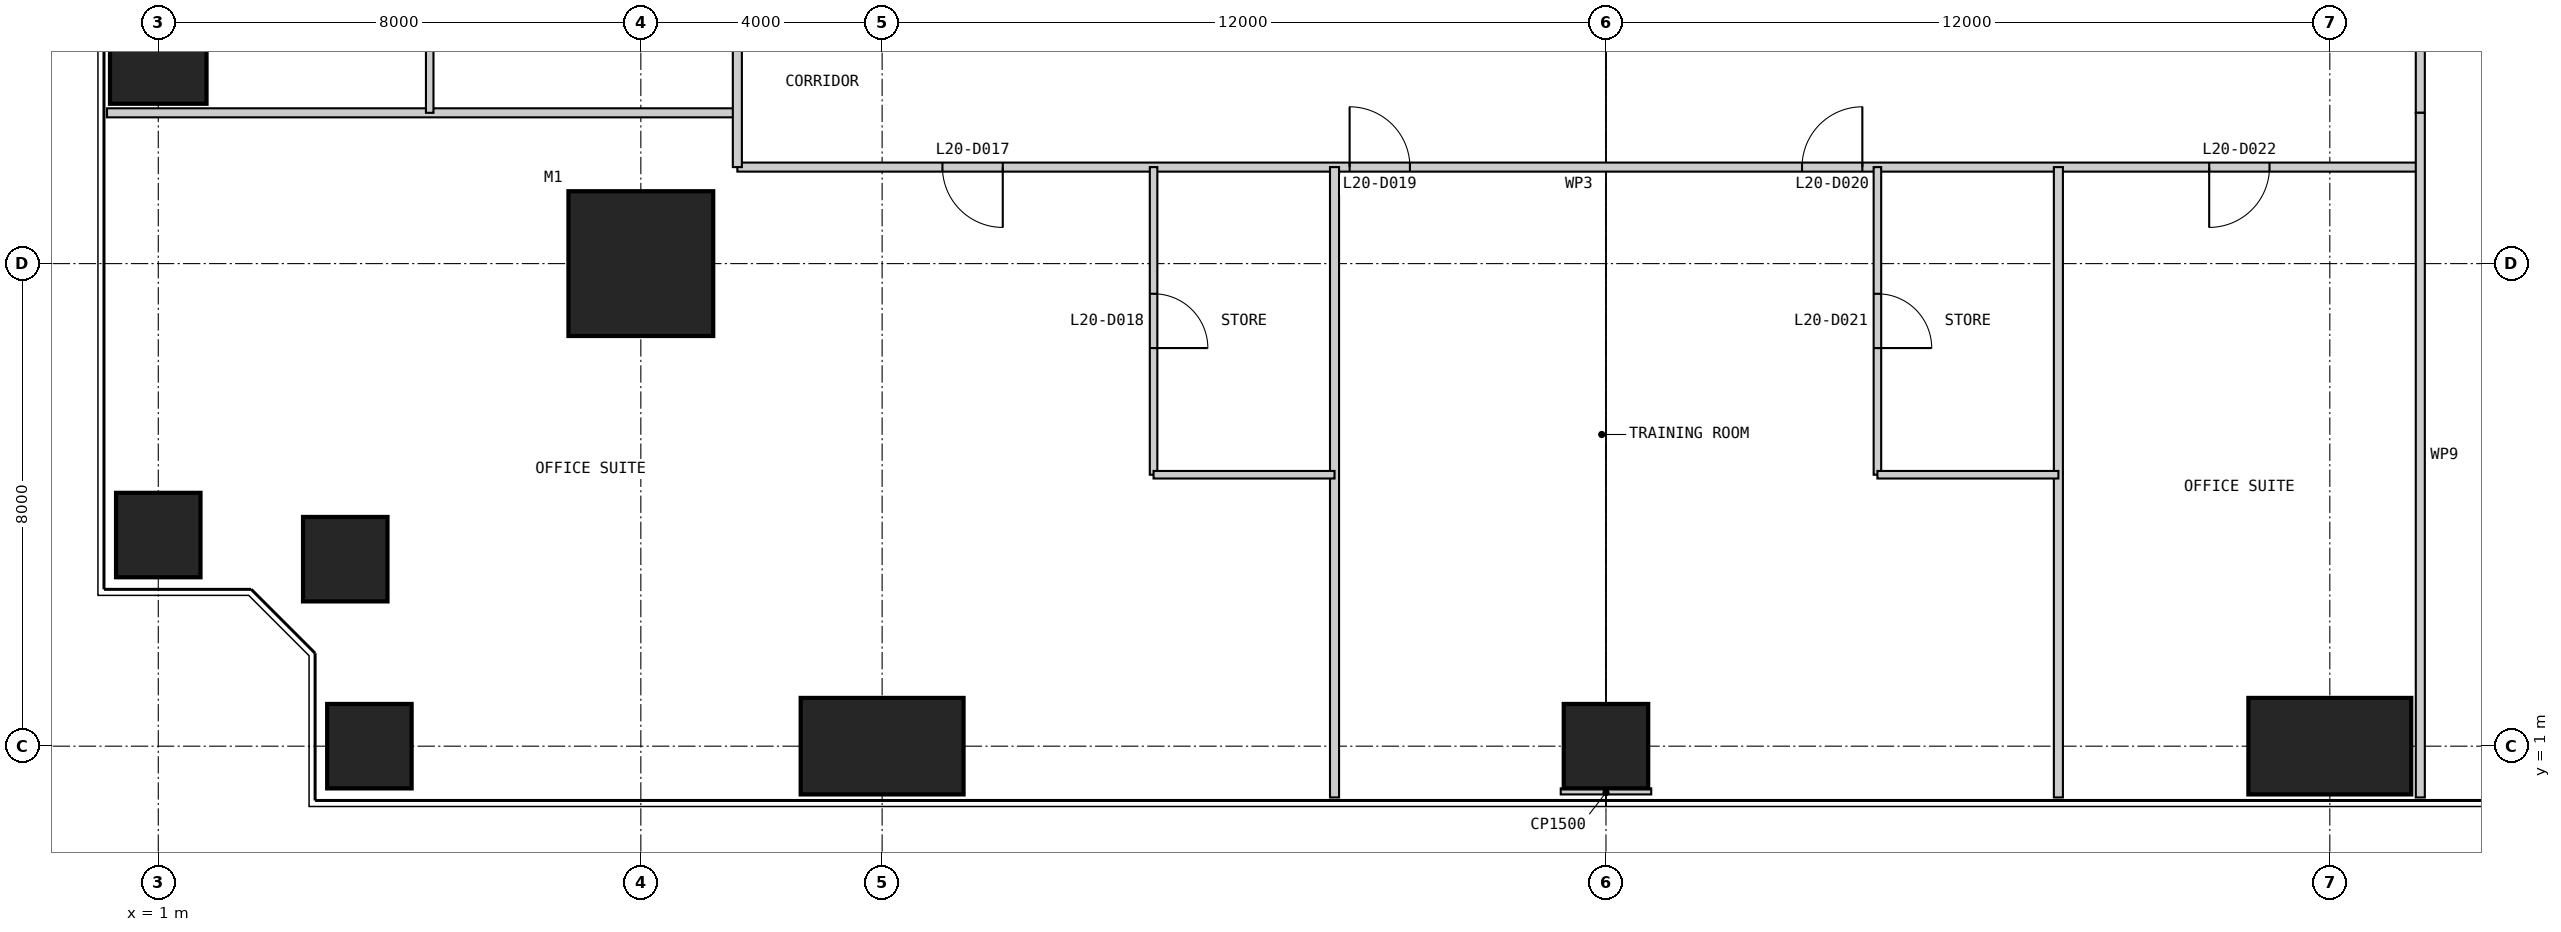
"""IFC4 building model, lengths in metres.
Left out: names, types, materials, properties, quantities, classifications, styles, units other than length and angle.
Written with IfcOpenShell. Run it as: python <this file> out.ifc"""

import sys

from ifc_helpers import new_model, si_unit, direction, frame, frame_2d, origin, origin_2d, place, context, subcontext, project, spatial, rectangle, extrude, element, fill, save


model = new_model("IFC4")
c1 = context("Model", 3, precision=1e-05, world=origin(), true_north=direction((0.0, 1.0)))
c2 = subcontext(c1, "Body", "Model", "MODEL_VIEW")
j1 = project(units=[si_unit("LENGTHUNIT", "METRE"), si_unit("PLANEANGLEUNIT", "RADIAN")], contexts=[c1])
p1 = place(None, origin())
s1 = spatial("IfcSite", under=j1, at=p1, CompositionType="ELEMENT")
p2 = place(p1, origin())
s2 = spatial("IfcBuilding", under=s1, at=p2, CompositionType="ELEMENT")
p3 = place(p2, frame((0.0, 0.0, 87.0)))
s3 = spatial("IfcBuildingStorey", under=s2, at=p3, CompositionType="ELEMENT", Elevation=87.0)
p4 = place(p3, frame((9.0, 9.0, 0.0), z_axis=(0.0, 0.0, 1.0), x_axis=(1.0, 0.0, 0.0)))
e1 = element("IfcColumn", 1, at=p4, inside=s3, PredefinedType="COLUMN", context=c2, shape_type="SweptSolid", body=[
    extrude(rectangle(XDim=2.4, YDim=2.4, at=origin_2d()), origin(), (0.0, 0.0, 1.0), 4.0),
])
p5 = place(p3, frame((4.5, 1.0, 0.0), z_axis=(0.0, 0.0, 1.0), x_axis=(1.0, 0.0, 0.0)))
e2 = element("IfcColumn", 2, at=p5, inside=s3, PredefinedType="COLUMN", context=c2, shape_type="SweptSolid", body=[
    extrude(rectangle(XDim=1.4, YDim=1.4, at=origin_2d()), origin(), (0.0, 0.0, 1.0), 4.0),
])
p6 = place(p3, frame((13.0, 1.0, 0.0), z_axis=(0.0, 0.0, 1.0), x_axis=(1.0, 0.0, 0.0)))
e3 = element("IfcColumn", 3, at=p6, inside=s3, PredefinedType="COLUMN", context=c2, shape_type="SweptSolid", body=[
    extrude(rectangle(XDim=2.7, YDim=1.6, at=origin_2d()), origin(), (0.0, 0.0, 1.0), 4.0),
])
p7 = place(p3, frame((25.0, 1.0, 0.0), z_axis=(0.0, 0.0, 1.0), x_axis=(1.0, 0.0, 0.0)))
e4 = element("IfcColumn", 4, at=p7, inside=s3, PredefinedType="COLUMN", context=c2, shape_type="SweptSolid", body=[
    extrude(rectangle(XDim=1.4, YDim=1.4, at=origin_2d()), origin(), (0.0, 0.0, 1.0), 4.0),
])
p8 = place(p3, frame((37.0, 1.0, 0.0), z_axis=(0.0, 0.0, 1.0), x_axis=(1.0, 0.0, 0.0)))
e5 = element("IfcColumn", 5, at=p8, inside=s3, PredefinedType="COLUMN", context=c2, shape_type="SweptSolid", body=[
    extrude(rectangle(XDim=2.7, YDim=1.6, at=origin_2d()), origin(), (0.0, 0.0, 1.0), 4.0),
])
p9 = place(p3, frame((1.0, 13.0, 0.0), z_axis=(0.0, 0.0, 1.0), x_axis=(1.0, 0.0, 0.0)))
e6 = element("IfcColumn", 6, at=p9, inside=s3, PredefinedType="COLUMN", context=c2, shape_type="SweptSolid", body=[
    extrude(rectangle(XDim=1.6, YDim=2.7, at=origin_2d()), origin(), (0.0, 0.0, 1.0), 4.0),
])
for number, where, z_axis, x_axis in (
    (7, (1.0, 4.5, 0.0), (0.0, 0.0, 1.0), (1.0, 0.0, 0.0)),
    (8, (4.1, 4.1, 0.0), (0.0, 0.0, 1.0), (1.0, 0.0, 0.0)),
):
    element("IfcColumn", number, at=place(p3, frame(where, z_axis=z_axis, x_axis=x_axis)), inside=s3, PredefinedType="COLUMN", context=c2, shape_type="SweptSolid", body=[
        extrude(rectangle(XDim=1.4, YDim=1.4, at=origin_2d()), origin(), (0.0, 0.0, 1.0), 4.0),
    ])
p10 = place(p3, frame((10.6, 10.6, 0.0), z_axis=(0.0, 0.0, 1.0), x_axis=(1.0, 0.0, 0.0)))
e9 = element("IfcWall", 9, at=p10, inside=s3, PredefinedType="PARTITIONING", context=c2, shape_type="SweptSolid", body=[
    extrude(rectangle(XDim=27.9, YDim=0.15, at=frame_2d((13.95, 0.0))), origin(), (0.0, 0.0, 1.0), 3.8),
])
p11 = place(p10, frame((3.4, 0.0, 0.0)))
e10 = element("IfcOpeningElement", 10, at=p11, cuts=e9, PredefinedType="OPENING", context=c2, shape_type="SweptSolid", body=[
    extrude(rectangle(XDim=1.0, YDim=2.2, at=frame_2d((0.5, 1.1))), frame((0.0, 0.085, 0.0), z_axis=(0.0, -1.0, 0.0), x_axis=(1.0, 0.0, 0.0)), (0.0, 0.0, 1.0), 0.17),
])
p12 = place(p10, frame((10.15, 0.0, 0.0)))
e11 = element("IfcOpeningElement", 11, at=p12, cuts=e9, PredefinedType="OPENING", context=c2, shape_type="SweptSolid", body=[
    extrude(rectangle(XDim=1.0, YDim=2.2, at=frame_2d((0.5, 1.1))), frame((0.0, 0.085, 0.0), z_axis=(0.0, -1.0, 0.0), x_axis=(1.0, 0.0, 0.0)), (0.0, 0.0, 1.0), 0.17),
])
p13 = place(p10, frame((17.65, 0.0, 0.0)))
e12 = element("IfcOpeningElement", 12, at=p13, cuts=e9, PredefinedType="OPENING", context=c2, shape_type="SweptSolid", body=[
    extrude(rectangle(XDim=1.0, YDim=2.2, at=frame_2d((0.5, 1.1))), frame((0.0, 0.085, 0.0), z_axis=(0.0, -1.0, 0.0), x_axis=(1.0, 0.0, 0.0)), (0.0, 0.0, 1.0), 0.17),
])
p14 = place(p10, frame((24.4, 0.0, 0.0)))
e13 = element("IfcOpeningElement", 13, at=p14, cuts=e9, PredefinedType="OPENING", context=c2, shape_type="SweptSolid", body=[
    extrude(rectangle(XDim=1.0, YDim=2.2, at=frame_2d((0.5, 1.1))), frame((0.0, 0.085, 0.0), z_axis=(0.0, -1.0, 0.0), x_axis=(1.0, 0.0, 0.0)), (0.0, 0.0, 1.0), 0.17),
])
p15 = place(p3, frame((0.15, 11.5, 0.0), z_axis=(0.0, 0.0, 1.0), x_axis=(1.0, 0.0, 0.0)))
e14 = element("IfcWall", 14, at=p15, inside=s3, PredefinedType="PARTITIONING", context=c2, shape_type="SweptSolid", body=[
    extrude(rectangle(XDim=10.45, YDim=0.15, at=frame_2d((5.225, 0.0))), origin(), (0.0, 0.0, 1.0), 3.8),
])
p16 = place(p3, frame((17.5, 5.5, 0.0), z_axis=(0.0, 0.0, 1.0), x_axis=(0.0, 1.0, 0.0)))
e15 = element("IfcWall", 15, at=p16, inside=s3, PredefinedType="PARTITIONING", context=c2, shape_type="SweptSolid", body=[
    extrude(rectangle(XDim=5.1, YDim=0.125, at=frame_2d((2.55, 0.0))), origin(), (0.0, 0.0, 1.0), 3.8),
])
p17 = place(p16, frame((2.1, 0.0, 0.0)))
e16 = element("IfcOpeningElement", 16, at=p17, cuts=e15, PredefinedType="OPENING", context=c2, shape_type="SweptSolid", body=[
    extrude(rectangle(XDim=0.9, YDim=2.2, at=frame_2d((0.45, 1.1))), frame((0.0, 0.073, 0.0), z_axis=(0.0, -1.0, 0.0), x_axis=(1.0, 0.0, 0.0)), (0.0, 0.0, 1.0), 0.145),
])
p18 = place(p3, frame((20.5, 0.15, 0.0), z_axis=(0.0, 0.0, 1.0), x_axis=(0.0, 1.0, 0.0)))
e17 = element("IfcWall", 17, at=p18, inside=s3, PredefinedType="PARTITIONING", context=c2, shape_type="SweptSolid", body=[
    extrude(rectangle(XDim=10.45, YDim=0.15, at=frame_2d((5.225, 0.0))), origin(), (0.0, 0.0, 1.0), 3.8),
])
p19 = place(p3, frame((29.5, 5.5, 0.0), z_axis=(0.0, 0.0, 1.0), x_axis=(0.0, 1.0, 0.0)))
e18 = element("IfcWall", 18, at=p19, inside=s3, PredefinedType="PARTITIONING", context=c2, shape_type="SweptSolid", body=[
    extrude(rectangle(XDim=5.1, YDim=0.125, at=frame_2d((2.55, 0.0))), origin(), (0.0, 0.0, 1.0), 3.8),
])
p20 = place(p19, frame((2.1, 0.0, 0.0)))
e19 = element("IfcOpeningElement", 19, at=p20, cuts=e18, PredefinedType="OPENING", context=c2, shape_type="SweptSolid", body=[
    extrude(rectangle(XDim=0.9, YDim=2.2, at=frame_2d((0.45, 1.1))), frame((0.0, 0.073, 0.0), z_axis=(0.0, -1.0, 0.0), x_axis=(1.0, 0.0, 0.0)), (0.0, 0.0, 1.0), 0.145),
])
p21 = place(p3, frame((32.5, 0.15, 0.0), z_axis=(0.0, 0.0, 1.0), x_axis=(0.0, 1.0, 0.0)))
e20 = element("IfcWall", 20, at=p21, inside=s3, PredefinedType="PARTITIONING", context=c2, shape_type="SweptSolid", body=[
    extrude(rectangle(XDim=10.45, YDim=0.15, at=frame_2d((5.225, 0.0))), origin(), (0.0, 0.0, 1.0), 3.8),
])
for number, where, z_axis, x_axis in (
    (21, (17.5, 5.5, 0.0), (0.0, 0.0, 1.0), (1.0, 0.0, 0.0)),
    (22, (29.5, 5.5, 0.0), (0.0, 0.0, 1.0), (1.0, 0.0, 0.0)),
):
    element("IfcWall", number, at=place(p3, frame(where, z_axis=z_axis, x_axis=x_axis)), inside=s3, PredefinedType="PARTITIONING", context=c2, shape_type="SweptSolid", body=[
        extrude(rectangle(XDim=3.0, YDim=0.125, at=frame_2d((1.5, 0.0))), origin(), (0.0, 0.0, 1.0), 3.8),
    ])
p22 = place(p3, frame((38.5, 11.5, 0.0), z_axis=(0.0, 0.0, 1.0), x_axis=(0.0, 1.0, 0.0)))
e23 = element("IfcWall", 23, at=p22, inside=s3, PredefinedType="PARTITIONING", context=c2, shape_type="SweptSolid", body=[
    extrude(rectangle(XDim=27.0, YDim=0.15, at=frame_2d((13.5, 0.0))), origin(), (0.0, 0.0, 1.0), 3.8),
])
p23 = place(p22, frame((2.5, 0.0, 0.0)))
e24 = element("IfcOpeningElement", 24, at=p23, cuts=e23, PredefinedType="OPENING", context=c2, shape_type="SweptSolid", body=[
    extrude(rectangle(XDim=1.0, YDim=2.2, at=frame_2d((0.5, 1.1))), frame((0.0, 0.085, 0.0), z_axis=(0.0, -1.0, 0.0), x_axis=(1.0, 0.0, 0.0)), (0.0, 0.0, 1.0), 0.17),
])
p24 = place(p22, frame((16.0, 0.0, 0.0)))
e25 = element("IfcOpeningElement", 25, at=p24, cuts=e23, PredefinedType="OPENING", context=c2, shape_type="SweptSolid", body=[
    extrude(rectangle(XDim=1.0, YDim=2.2, at=frame_2d((0.5, 1.1))), frame((0.0, 0.085, 0.0), z_axis=(0.0, -1.0, 0.0), x_axis=(1.0, 0.0, 0.0)), (0.0, 0.0, 1.0), 0.17),
])
p25 = place(p3, frame((38.5, 0.15, 0.0), z_axis=(0.0, 0.0, 1.0), x_axis=(0.0, 1.0, 0.0)))
e26 = element("IfcWall", 26, at=p25, inside=s3, PredefinedType="PARTITIONING", context=c2, shape_type="SweptSolid", body=[
    extrude(rectangle(XDim=11.35, YDim=0.15, at=frame_2d((5.675, 0.0))), origin(), (0.0, 0.0, 1.0), 3.8),
])
p26 = place(p3, frame((10.6, 39.4, 0.0), z_axis=(0.0, 0.0, 1.0), x_axis=(0.0, -1.0, 0.0)))
e27 = element("IfcWall", 27, at=p26, inside=s3, PredefinedType="PARTITIONING", context=c2, shape_type="SweptSolid", body=[
    extrude(rectangle(XDim=28.8, YDim=0.15, at=frame_2d((14.4, 0.0))), origin(), (0.0, 0.0, 1.0), 3.8),
])
p27 = place(p26, frame((1.15, 0.0, 0.0)))
e28 = element("IfcOpeningElement", 28, at=p27, cuts=e27, PredefinedType="OPENING", context=c2, shape_type="SweptSolid", body=[
    extrude(rectangle(XDim=1.0, YDim=2.2, at=frame_2d((0.5, 1.1))), frame((0.0, 0.085, 0.0), z_axis=(0.0, -1.0, 0.0), x_axis=(1.0, 0.0, 0.0)), (0.0, 0.0, 1.0), 0.17),
])
p28 = place(p26, frame((23.65, 0.0, 0.0)))
e29 = element("IfcOpeningElement", 29, at=p28, cuts=e27, PredefinedType="OPENING", context=c2, shape_type="SweptSolid", body=[
    extrude(rectangle(XDim=1.0, YDim=2.2, at=frame_2d((0.5, 1.1))), frame((0.0, 0.085, 0.0), z_axis=(0.0, -1.0, 0.0), x_axis=(1.0, 0.0, 0.0)), (0.0, 0.0, 1.0), 0.17),
])
p29 = place(p3, frame((5.5, 29.5, 0.0), z_axis=(0.0, 0.0, 1.0), x_axis=(0.0, -1.0, 0.0)))
e30 = element("IfcWall", 30, at=p29, inside=s3, PredefinedType="PARTITIONING", context=c2, shape_type="SweptSolid", body=[
    extrude(rectangle(XDim=18.0, YDim=0.125, at=frame_2d((9.0, 0.0))), origin(), (0.0, 0.0, 1.0), 3.8),
])
p30 = place(p29, frame((10.0, 0.0, 0.0)))
e31 = element("IfcOpeningElement", 31, at=p30, cuts=e30, PredefinedType="OPENING", context=c2, shape_type="SweptSolid", body=[
    extrude(rectangle(XDim=1.0, YDim=2.2, at=frame_2d((0.5, 1.1))), frame((0.0, 0.073, 0.0), z_axis=(0.0, -1.0, 0.0), x_axis=(1.0, 0.0, 0.0)), (0.0, 0.0, 1.0), 0.145),
])
p31 = place(p29, frame((13.05, 0.0, 0.0)))
e32 = element("IfcOpeningElement", 32, at=p31, cuts=e30, PredefinedType="OPENING", context=c2, shape_type="SweptSolid", body=[
    extrude(rectangle(XDim=0.9, YDim=2.2, at=frame_2d((0.45, 1.1))), frame((0.0, 0.073, 0.0), z_axis=(0.0, -1.0, 0.0), x_axis=(1.0, 0.0, 0.0)), (0.0, 0.0, 1.0), 0.145),
])
p32 = place(p3, frame((25.0, 0.2, 0.0), z_axis=(0.0, 0.0, 1.0), x_axis=(0.0, 1.0, 0.0)))
e33 = element("IfcWall", 33, at=p32, inside=s3, PredefinedType="PARTITIONING", context=c2, shape_type="SweptSolid", body=[
    extrude(rectangle(XDim=0.1, YDim=1.5, at=frame_2d((0.05, 0.0))), origin(), (0.0, 0.0, 1.0), 3.8),
])
p33 = place(p11, frame((1.0, 0.0, 0.0), z_axis=(0.0, 0.0, 1.0), x_axis=(-1.0, 0.0, 0.0)))
e34 = element("IfcDoor", 34, at=p33, inside=s3, OperationType="SINGLE_SWING_LEFT", PredefinedType="DOOR", context=c2, shape_type="SweptSolid", body=[
    extrude(rectangle(XDim=1.0, YDim=2.2, at=frame_2d((0.5, 1.1))), frame((0.0, 0.025, 0.0), z_axis=(0.0, -1.0, 0.0), x_axis=(1.0, 0.0, 0.0)), (0.0, 0.0, 1.0), 0.05),
])
fill(e10, e34)
p34 = place(p17, frame((0.9, 0.0, 0.0), z_axis=(0.0, 0.0, 1.0), x_axis=(-1.0, 0.0, 0.0)))
e35 = element("IfcDoor", 35, at=p34, inside=s3, OperationType="SINGLE_SWING_RIGHT", PredefinedType="DOOR", context=c2, shape_type="SweptSolid", body=[
    extrude(rectangle(XDim=0.9, YDim=2.2, at=frame_2d((0.45, 1.1))), frame((0.0, 0.025, 0.0), z_axis=(0.0, -1.0, 0.0), x_axis=(1.0, 0.0, 0.0)), (0.0, 0.0, 1.0), 0.05),
])
fill(e16, e35)
p35 = place(p12, origin())
e36 = element("IfcDoor", 36, at=p35, inside=s3, OperationType="SINGLE_SWING_LEFT", PredefinedType="DOOR", context=c2, shape_type="SweptSolid", body=[
    extrude(rectangle(XDim=1.0, YDim=2.2, at=frame_2d((0.5, 1.1))), frame((0.0, 0.025, 0.0), z_axis=(0.0, -1.0, 0.0), x_axis=(1.0, 0.0, 0.0)), (0.0, 0.0, 1.0), 0.05),
])
fill(e11, e36)
p36 = place(p13, origin())
e37 = element("IfcDoor", 37, at=p36, inside=s3, OperationType="SINGLE_SWING_RIGHT", PredefinedType="DOOR", context=c2, shape_type="SweptSolid", body=[
    extrude(rectangle(XDim=1.0, YDim=2.2, at=frame_2d((0.5, 1.1))), frame((0.0, 0.025, 0.0), z_axis=(0.0, -1.0, 0.0), x_axis=(1.0, 0.0, 0.0)), (0.0, 0.0, 1.0), 0.05),
])
fill(e12, e37)
p37 = place(p20, frame((0.9, 0.0, 0.0), z_axis=(0.0, 0.0, 1.0), x_axis=(-1.0, 0.0, 0.0)))
e38 = element("IfcDoor", 38, at=p37, inside=s3, OperationType="SINGLE_SWING_RIGHT", PredefinedType="DOOR", context=c2, shape_type="SweptSolid", body=[
    extrude(rectangle(XDim=0.9, YDim=2.2, at=frame_2d((0.45, 1.1))), frame((0.0, 0.025, 0.0), z_axis=(0.0, -1.0, 0.0), x_axis=(1.0, 0.0, 0.0)), (0.0, 0.0, 1.0), 0.05),
])
fill(e19, e38)
p38 = place(p14, frame((1.0, 0.0, 0.0), z_axis=(0.0, 0.0, 1.0), x_axis=(-1.0, 0.0, 0.0)))
e39 = element("IfcDoor", 39, at=p38, inside=s3, OperationType="SINGLE_SWING_RIGHT", PredefinedType="DOOR", context=c2, shape_type="SweptSolid", body=[
    extrude(rectangle(XDim=1.0, YDim=2.2, at=frame_2d((0.5, 1.1))), frame((0.0, 0.025, 0.0), z_axis=(0.0, -1.0, 0.0), x_axis=(1.0, 0.0, 0.0)), (0.0, 0.0, 1.0), 0.05),
])
fill(e13, e39)
save(model, sys.argv[1])
